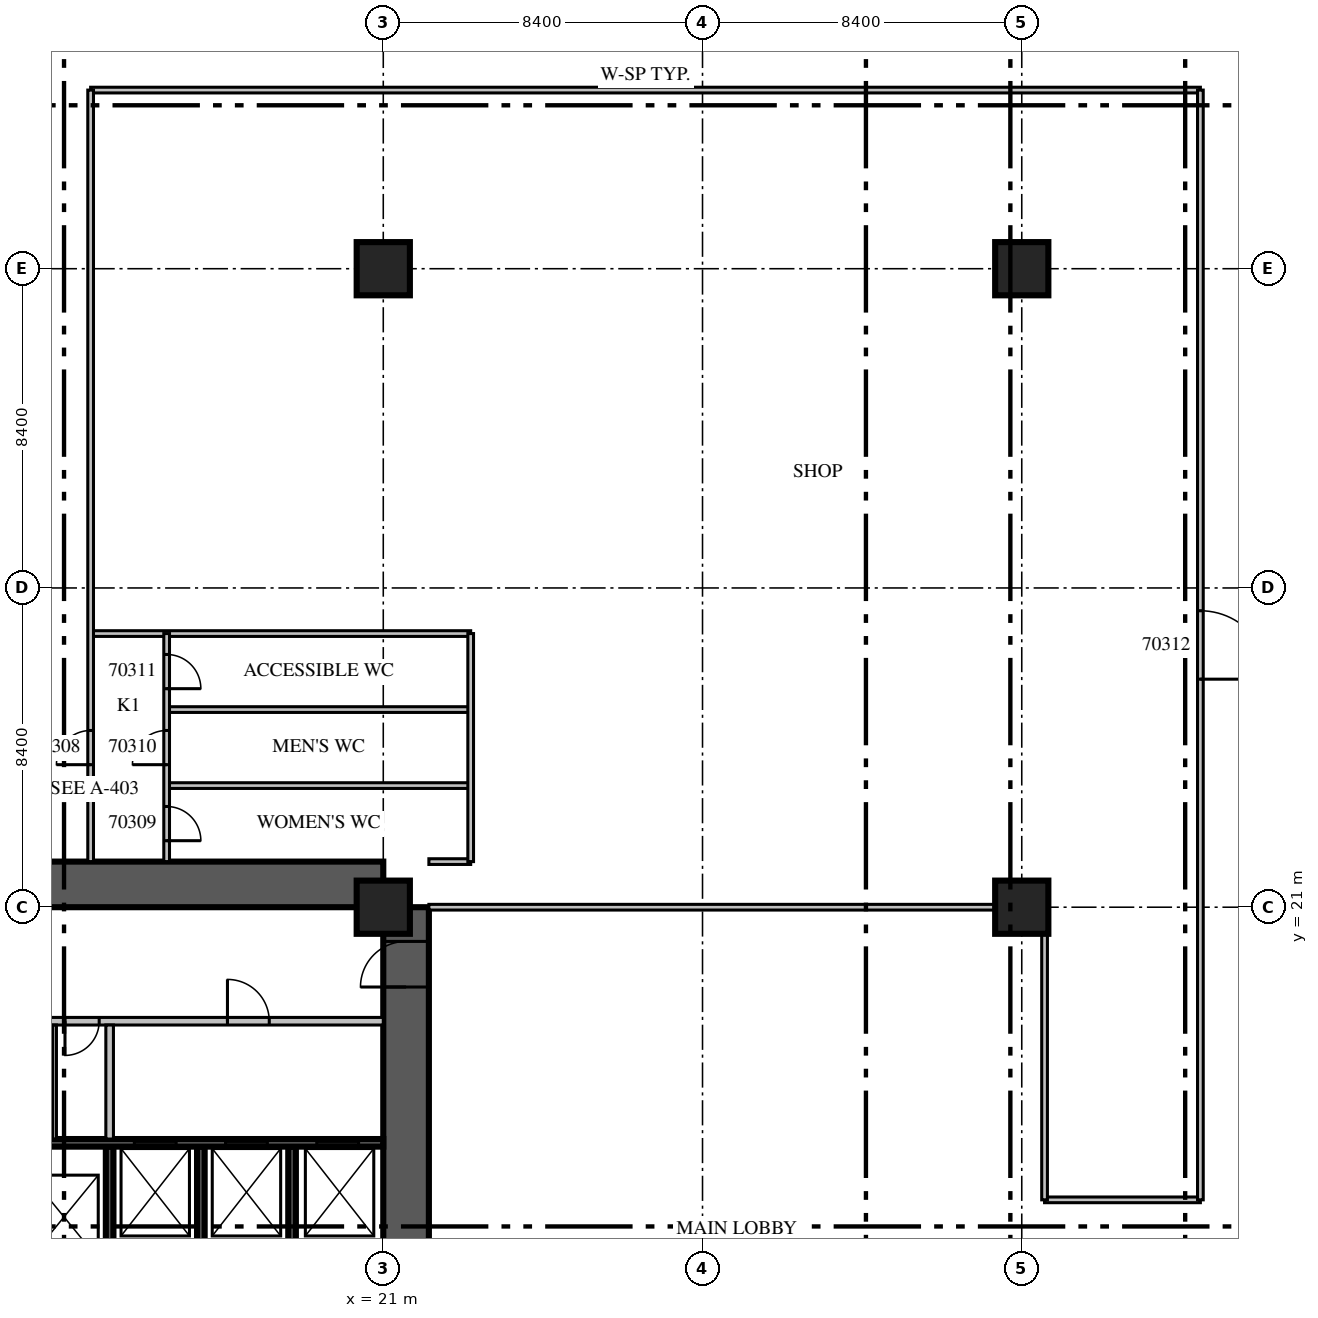
"""IFC4 building model, lengths in metres.
Left out: names, types, materials, properties, quantities, classifications, styles, units other than length and angle.
Written with IfcOpenShell. Run it as: python <this file> out.ifc"""

import sys

from ifc_helpers import new_model, si_unit, direction, frame, frame_2d, origin, origin_2d, place, context, subcontext, project, spatial, rectangle, extrude, source, transform, mapped, element, fill, save


model = new_model("IFC4")
c1 = context("Model", 3, precision=1e-05, world=origin(), true_north=direction((0.0, 1.0)))
c2 = subcontext(c1, "Body", "Model", "MODEL_VIEW")
j1 = project(units=[si_unit("LENGTHUNIT", "METRE"), si_unit("PLANEANGLEUNIT", "RADIAN")], contexts=[c1])
p1 = place(None, origin())
s1 = spatial("IfcSite", under=j1, at=p1, CompositionType="ELEMENT")
p2 = place(p1, origin())
s2 = spatial("IfcBuilding", under=s1, at=p2, CompositionType="ELEMENT")
p3 = place(p2, origin())
s3 = spatial("IfcBuildingStorey", under=s2, at=p3, CompositionType="ELEMENT", Elevation=0.0)
m1 = source(origin(), c2, "Body", "SweptSolid", [
    extrude(rectangle(XDim=1.4, YDim=1.4, at=origin_2d()), origin(), (0.0, 0.0, 1.0), 7.5),
])
for number, where, z_axis, x_axis in (
    (1, (21.0, 21.0, 0.0), (0.0, 0.0, 1.0), (1.0, 0.0, 0.0)),
    (2, (21.0, 37.8, 0.0), (0.0, 0.0, 1.0), (1.0, 0.0, 0.0)),
    (3, (37.8, 21.0, 0.0), (0.0, 0.0, 1.0), (1.0, 0.0, 0.0)),
    (4, (37.8, 37.8, 0.0), (0.0, 0.0, 1.0), (1.0, 0.0, 0.0)),
):
    element("IfcColumn", number, at=place(p3, frame(where, z_axis=z_axis, x_axis=x_axis)), inside=s3, PredefinedType="COLUMN", context=c2, shape_type="MappedRepresentation", body=[
        mapped(m1, transform((0.0, 0.0, 0.0), scale=1.0)),
    ])
p4 = place(p3, frame((21.6, 4.2, 0.0), z_axis=(0.0, 0.0, 1.0), x_axis=(0.0, 1.0, 0.0)))
e5 = element("IfcWall", 5, at=p4, inside=s3, PredefinedType="SHEAR", context=c2, shape_type="SweptSolid", body=[
    extrude(rectangle(XDim=16.8, YDim=1.2, at=frame_2d((8.4, 0.0))), origin(), (0.0, 0.0, 1.0), 7.5),
])
m2 = source(origin(), c2, "Body", "SweptSolid", [
    extrude(rectangle(XDim=2.2, YDim=2.1, at=frame_2d((1.1, 1.05))), frame((0.0, 0.61, 0.0), z_axis=(0.0, -1.0, 0.0), x_axis=(1.0, 0.0, 0.0)), (0.0, 0.0, 1.0), 1.22),
])
p5 = place(p4, frame((4.2, 0.0, 0.0)))
e6 = element("IfcOpeningElement", 6, at=p5, cuts=e5, PredefinedType="OPENING", context=c2, shape_type="MappedRepresentation", body=[
    mapped(m2, transform((0.0, 0.0, 0.0), scale=1.0)),
])
m3 = source(origin(), c2, "Body", "SweptSolid", [
    extrude(rectangle(XDim=1.2, YDim=2.1, at=frame_2d((0.6, 1.05))), frame((0.0, 0.61, 0.0), z_axis=(0.0, -1.0, 0.0), x_axis=(1.0, 0.0, 0.0)), (0.0, 0.0, 1.0), 1.22),
])
p6 = place(p4, frame((14.7, 0.0, 0.0)))
e7 = element("IfcOpeningElement", 7, at=p6, cuts=e5, PredefinedType="OPENING", context=c2, shape_type="MappedRepresentation", body=[
    mapped(m3, transform((0.0, 0.0, 0.0), scale=1.0)),
])
m4 = source(origin(), c2, "Body", "SweptSolid", [
    extrude(rectangle(XDim=16.8, YDim=1.2, at=frame_2d((8.4, 0.0))), origin(), (0.0, 0.0, 1.0), 7.5),
])
p7 = place(p3, frame((4.2, 21.6, 0.0), z_axis=(0.0, 0.0, 1.0), x_axis=(1.0, 0.0, 0.0)))
e8 = element("IfcWall", 8, at=p7, inside=s3, PredefinedType="SHEAR", context=c2, shape_type="MappedRepresentation", body=[
    mapped(m4, transform((0.0, 0.0, 0.0), scale=1.0)),
])
p8 = place(p7, frame((6.2, 0.0, 0.0)))
e9 = element("IfcOpeningElement", 9, at=p8, cuts=e8, PredefinedType="OPENING", context=c2, shape_type="MappedRepresentation", body=[
    mapped(m3, transform((0.0, 0.0, 0.0), scale=1.0)),
])
m5 = source(origin(), c2, "Body", "SweptSolid", [
    extrude(rectangle(XDim=3.0, YDim=0.2, at=frame_2d((1.5, 0.0))), origin(), (0.0, 0.0, 1.0), 7.5),
])
for number, where, z_axis, x_axis in (
    (10, (13.8, 11.7, 0.0), (0.0, 0.0, 1.0), (0.0, 1.0, 0.0)),
    (11, (16.2, 11.7, 0.0), (0.0, 0.0, 1.0), (0.0, 1.0, 0.0)),
    (12, (18.6, 11.7, 0.0), (0.0, 0.0, 1.0), (0.0, 1.0, 0.0)),
):
    element("IfcWall", number, at=place(p3, frame(where, z_axis=z_axis, x_axis=x_axis)), inside=s3, PredefinedType="SOLIDWALL", context=c2, shape_type="MappedRepresentation", body=[
        mapped(m5, transform((0.0, 0.0, 0.0), scale=1.0)),
    ])
m6 = source(origin(), c2, "Body", "SweptSolid", [
    extrude(rectangle(XDim=16.8, YDim=0.2, at=frame_2d((8.4, 0.0))), origin(), (0.0, 0.0, 1.0), 7.5),
])
p9 = place(p3, frame((4.2, 14.8, 0.0), z_axis=(0.0, 0.0, 1.0), x_axis=(1.0, 0.0, 0.0)))
e13 = element("IfcWall", 13, at=p9, inside=s3, PredefinedType="SOLIDWALL", context=c2, shape_type="MappedRepresentation", body=[
    mapped(m6, transform((0.0, 0.0, 0.0), scale=1.0)),
])
m7 = source(origin(), c2, "Body", "SweptSolid", [
    extrude(rectangle(XDim=1.1, YDim=2.1, at=frame_2d((0.55, 1.05))), frame((0.0, 0.11, 0.0), z_axis=(0.0, -1.0, 0.0), x_axis=(1.0, 0.0, 0.0)), (0.0, 0.0, 1.0), 0.22),
])
p10 = place(p9, frame((10.25, 0.0, 0.0)))
e14 = element("IfcOpeningElement", 14, at=p10, cuts=e13, PredefinedType="OPENING", context=c2, shape_type="MappedRepresentation", body=[
    mapped(m7, transform((0.0, 0.0, 0.0), scale=1.0)),
])
p11 = place(p9, frame((12.65, 0.0, 0.0)))
e15 = element("IfcOpeningElement", 15, at=p11, cuts=e13, PredefinedType="OPENING", context=c2, shape_type="MappedRepresentation", body=[
    mapped(m7, transform((0.0, 0.0, 0.0), scale=1.0)),
])
p12 = place(p9, frame((15.05, 0.0, 0.0)))
e16 = element("IfcOpeningElement", 16, at=p12, cuts=e13, PredefinedType="OPENING", context=c2, shape_type="MappedRepresentation", body=[
    mapped(m7, transform((0.0, 0.0, 0.0), scale=1.0)),
])
p13 = place(p3, frame((9.55, 18.0, 0.0), z_axis=(0.0, 0.0, 1.0), x_axis=(1.0, 0.0, 0.0)))
e17 = element("IfcWall", 17, at=p13, inside=s3, PredefinedType="PARTITIONING", context=c2, shape_type="SweptSolid", body=[
    extrude(rectangle(XDim=11.45, YDim=0.2, at=frame_2d((5.725, 0.0))), origin(), (0.0, 0.0, 1.0), 6.9),
])
m8 = source(origin(), c2, "Body", "SweptSolid", [
    extrude(rectangle(XDim=0.9, YDim=2.1, at=frame_2d((0.45, 1.05))), frame((0.0, 0.11, 0.0), z_axis=(0.0, -1.0, 0.0), x_axis=(1.0, 0.0, 0.0)), (0.0, 0.0, 1.0), 0.22),
])
p14 = place(p13, frame((0.375, 0.0, 0.0)))
e18 = element("IfcOpeningElement", 18, at=p14, cuts=e17, PredefinedType="OPENING", context=c2, shape_type="MappedRepresentation", body=[
    mapped(m8, transform((0.0, 0.0, 0.0), scale=1.0)),
])
p15 = place(p13, frame((1.7, 0.0, 0.0)))
e19 = element("IfcOpeningElement", 19, at=p15, cuts=e17, PredefinedType="OPENING", context=c2, shape_type="MappedRepresentation", body=[
    mapped(m8, transform((0.0, 0.0, 0.0), scale=1.0)),
])
p16 = place(p13, frame((3.075, 0.0, 0.0)))
e20 = element("IfcOpeningElement", 20, at=p16, cuts=e17, PredefinedType="OPENING", context=c2, shape_type="MappedRepresentation", body=[
    mapped(m8, transform((0.0, 0.0, 0.0), scale=1.0)),
])
p17 = place(p13, frame((7.35, 0.0, 0.0)))
e21 = element("IfcOpeningElement", 21, at=p17, cuts=e17, PredefinedType="OPENING", context=c2, shape_type="MappedRepresentation", body=[
    mapped(m7, transform((0.0, 0.0, 0.0), scale=1.0)),
])
m9 = source(origin(), c2, "Body", "SweptSolid", [
    extrude(rectangle(XDim=3.0, YDim=0.2, at=frame_2d((1.5, 0.0))), origin(), (0.0, 0.0, 1.0), 6.9),
])
p18 = place(p3, frame((13.8, 14.9, 0.0), z_axis=(0.0, 0.0, 1.0), x_axis=(0.0, 1.0, 0.0)))
e22 = element("IfcWall", 22, at=p18, inside=s3, PredefinedType="PARTITIONING", context=c2, shape_type="MappedRepresentation", body=[
    mapped(m9, transform((0.0, 0.0, 0.0), scale=1.0)),
])
m10 = source(origin(), c2, "Body", "SweptSolid", [
    extrude(rectangle(XDim=3.0, YDim=0.1, at=frame_2d((1.5, 0.0))), origin(), (0.0, 0.0, 1.0), 6.9),
])
p19 = place(p3, frame((12.35, 14.9, 0.0), z_axis=(0.0, 0.0, 1.0), x_axis=(0.0, 1.0, 0.0)))
e23 = element("IfcWall", 23, at=p19, inside=s3, PredefinedType="PARTITIONING", context=c2, shape_type="MappedRepresentation", body=[
    mapped(m10, transform((0.0, 0.0, 0.0), scale=1.0)),
])
p20 = place(p3, frame((38.4, 13.3, 0.0), z_axis=(0.0, 0.0, 1.0), x_axis=(1.0, 0.0, 0.0)))
e24 = element("IfcWall", 24, at=p20, inside=s3, PredefinedType="PARTITIONING", context=c2, shape_type="SweptSolid", body=[
    extrude(rectangle(XDim=4.1, YDim=0.15, at=frame_2d((2.05, 0.0))), origin(), (0.0, 0.0, 1.0), 6.9),
])
p21 = place(p3, frame((22.2, 21.0, 0.0), z_axis=(0.0, 0.0, 1.0), x_axis=(1.0, 0.0, 0.0)))
e25 = element("IfcWall", 25, at=p21, inside=s3, PredefinedType="PARTITIONING", context=c2, shape_type="SweptSolid", body=[
    extrude(rectangle(XDim=16.2, YDim=0.15, at=frame_2d((8.1, 0.0))), origin(), (0.0, 0.0, 1.0), 6.9),
])
p22 = place(p3, frame((22.2, 22.2, 0.0), z_axis=(0.0, 0.0, 1.0), x_axis=(1.0, 0.0, 0.0)))
e26 = element("IfcWall", 26, at=p22, inside=s3, PredefinedType="PARTITIONING", context=c2, shape_type="SweptSolid", body=[
    extrude(rectangle(XDim=1.1, YDim=0.15, at=frame_2d((0.55, 0.0))), origin(), (0.0, 0.0, 1.0), 6.9),
])
p23 = place(p3, frame((15.3, 24.2, 0.0), z_axis=(0.0, 0.0, 1.0), x_axis=(1.0, 0.0, 0.0)))
e27 = element("IfcWall", 27, at=p23, inside=s3, PredefinedType="PARTITIONING", context=c2, shape_type="SweptSolid", body=[
    extrude(rectangle(XDim=8.0, YDim=0.15, at=frame_2d((4.0, 0.0))), origin(), (0.0, 0.0, 1.0), 6.9),
])
m11 = source(origin(), c2, "Body", "SweptSolid", [
    extrude(rectangle(XDim=8.0, YDim=0.15, at=frame_2d((4.0, 0.0))), origin(), (0.0, 0.0, 1.0), 6.9),
])
p24 = place(p3, frame((15.3, 26.2, 0.0), z_axis=(0.0, 0.0, 1.0), x_axis=(1.0, 0.0, 0.0)))
e28 = element("IfcWall", 28, at=p24, inside=s3, PredefinedType="PARTITIONING", context=c2, shape_type="MappedRepresentation", body=[
    mapped(m11, transform((0.0, 0.0, 0.0), scale=1.0)),
])
p25 = place(p3, frame((13.3, 28.2, 0.0), z_axis=(0.0, 0.0, 1.0), x_axis=(1.0, 0.0, 0.0)))
e29 = element("IfcWall", 29, at=p25, inside=s3, PredefinedType="PARTITIONING", context=c2, shape_type="SweptSolid", body=[
    extrude(rectangle(XDim=10.0, YDim=0.15, at=frame_2d((5.0, 0.0))), origin(), (0.0, 0.0, 1.0), 6.9),
])
p26 = place(p3, frame((13.3, 42.5, 0.0), z_axis=(0.0, 0.0, 1.0), x_axis=(1.0, 0.0, 0.0)))
e30 = element("IfcWall", 30, at=p26, inside=s3, PredefinedType="PARTITIONING", context=c2, shape_type="SweptSolid", body=[
    extrude(rectangle(XDim=29.2, YDim=0.15, at=frame_2d((14.6, 0.0))), origin(), (0.0, 0.0, 1.0), 6.9),
])
p27 = place(p3, frame((13.3, 22.2, 0.0), z_axis=(0.0, 0.0, 1.0), x_axis=(0.0, 1.0, 0.0)))
e31 = element("IfcWall", 31, at=p27, inside=s3, PredefinedType="PARTITIONING", context=c2, shape_type="SweptSolid", body=[
    extrude(rectangle(XDim=20.3, YDim=0.15, at=frame_2d((10.15, 0.0))), origin(), (0.0, 0.0, 1.0), 6.9),
])
m12 = source(origin(), c2, "Body", "SweptSolid", [
    extrude(rectangle(XDim=0.9, YDim=2.1, at=frame_2d((0.45, 1.05))), frame((0.0, 0.085, 0.0), z_axis=(0.0, -1.0, 0.0), x_axis=(1.0, 0.0, 0.0)), (0.0, 0.0, 1.0), 0.17),
])
p28 = place(p27, frame((2.55, 0.0, 0.0)))
e32 = element("IfcOpeningElement", 32, at=p28, cuts=e31, PredefinedType="OPENING", context=c2, shape_type="MappedRepresentation", body=[
    mapped(m12, transform((0.0, 0.0, 0.0), scale=1.0)),
])
p29 = place(p3, frame((15.3, 22.2, 0.0), z_axis=(0.0, 0.0, 1.0), x_axis=(0.0, 1.0, 0.0)))
e33 = element("IfcWall", 33, at=p29, inside=s3, PredefinedType="PARTITIONING", context=c2, shape_type="SweptSolid", body=[
    extrude(rectangle(XDim=6.0, YDim=0.15, at=frame_2d((3.0, 0.0))), origin(), (0.0, 0.0, 1.0), 6.9),
])
p30 = place(p29, frame((0.55, 0.0, 0.0)))
e34 = element("IfcOpeningElement", 34, at=p30, cuts=e33, PredefinedType="OPENING", context=c2, shape_type="MappedRepresentation", body=[
    mapped(m12, transform((0.0, 0.0, 0.0), scale=1.0)),
])
p31 = place(p29, frame((2.55, 0.0, 0.0)))
e35 = element("IfcOpeningElement", 35, at=p31, cuts=e33, PredefinedType="OPENING", context=c2, shape_type="MappedRepresentation", body=[
    mapped(m12, transform((0.0, 0.0, 0.0), scale=1.0)),
])
p32 = place(p29, frame((4.55, 0.0, 0.0)))
e36 = element("IfcOpeningElement", 36, at=p32, cuts=e33, PredefinedType="OPENING", context=c2, shape_type="MappedRepresentation", body=[
    mapped(m12, transform((0.0, 0.0, 0.0), scale=1.0)),
])
m13 = source(origin(), c2, "Body", "SweptSolid", [
    extrude(rectangle(XDim=6.0, YDim=0.15, at=frame_2d((3.0, 0.0))), origin(), (0.0, 0.0, 1.0), 6.9),
])
p33 = place(p3, frame((23.3, 22.2, 0.0), z_axis=(0.0, 0.0, 1.0), x_axis=(0.0, 1.0, 0.0)))
e37 = element("IfcWall", 37, at=p33, inside=s3, PredefinedType="PARTITIONING", context=c2, shape_type="MappedRepresentation", body=[
    mapped(m13, transform((0.0, 0.0, 0.0), scale=1.0)),
])
p34 = place(p3, frame((38.4, 13.3, 0.0), z_axis=(0.0, 0.0, 1.0), x_axis=(0.0, 1.0, 0.0)))
e38 = element("IfcWall", 38, at=p34, inside=s3, PredefinedType="PARTITIONING", context=c2, shape_type="SweptSolid", body=[
    extrude(rectangle(XDim=7.7, YDim=0.15, at=frame_2d((3.85, 0.0))), origin(), (0.0, 0.0, 1.0), 6.9),
])
m14 = source(origin(), c2, "Body", "SweptSolid", [
    extrude(rectangle(XDim=29.2, YDim=0.15, at=frame_2d((14.6, 0.0))), origin(), (0.0, 0.0, 1.0), 6.9),
])
p35 = place(p3, frame((42.5, 13.3, 0.0), z_axis=(0.0, 0.0, 1.0), x_axis=(0.0, 1.0, 0.0)))
e39 = element("IfcWall", 39, at=p35, inside=s3, PredefinedType="PARTITIONING", context=c2, shape_type="MappedRepresentation", body=[
    mapped(m14, transform((0.0, 0.0, 0.0), scale=1.0)),
])
m15 = source(origin(), c2, "Body", "SweptSolid", [
    extrude(rectangle(XDim=1.8, YDim=2.1, at=frame_2d((0.9, 1.05))), frame((0.0, 0.085, 0.0), z_axis=(0.0, -1.0, 0.0), x_axis=(1.0, 0.0, 0.0)), (0.0, 0.0, 1.0), 0.17),
])
p36 = place(p35, frame((13.7, 0.0, 0.0)))
e40 = element("IfcOpeningElement", 40, at=p36, cuts=e39, PredefinedType="OPENING", context=c2, shape_type="MappedRepresentation", body=[
    mapped(m15, transform((0.0, 0.0, 0.0), scale=1.0)),
])
m16 = source(origin(), c2, "Body", "SweptSolid", [
    extrude(rectangle(XDim=1.1, YDim=2.1, at=frame_2d((0.55, 1.05))), frame((0.0, 0.025, 0.0), z_axis=(0.0, -1.0, 0.0), x_axis=(1.0, 0.0, 0.0)), (0.0, 0.0, 1.0), 0.05),
])
p37 = place(p10, origin())
e41 = element("IfcDoor", 41, at=p37, inside=s3, OperationType="SLIDING_TO_LEFT", PredefinedType="DOOR", context=c2, shape_type="MappedRepresentation", body=[
    mapped(m16, transform((0.0, 0.0, 0.0), scale=1.0)),
])
fill(e14, e41)
p38 = place(p11, origin())
e42 = element("IfcDoor", 42, at=p38, inside=s3, OperationType="SLIDING_TO_LEFT", PredefinedType="DOOR", context=c2, shape_type="MappedRepresentation", body=[
    mapped(m16, transform((0.0, 0.0, 0.0), scale=1.0)),
])
fill(e15, e42)
p39 = place(p12, origin())
e43 = element("IfcDoor", 43, at=p39, inside=s3, OperationType="SLIDING_TO_LEFT", PredefinedType="DOOR", context=c2, shape_type="MappedRepresentation", body=[
    mapped(m16, transform((0.0, 0.0, 0.0), scale=1.0)),
])
fill(e16, e43)
m17 = source(origin(), c2, "Body", "SweptSolid", [
    extrude(rectangle(XDim=0.9, YDim=2.1, at=frame_2d((0.45, 1.05))), frame((0.0, 0.025, 0.0), z_axis=(0.0, -1.0, 0.0), x_axis=(1.0, 0.0, 0.0)), (0.0, 0.0, 1.0), 0.05),
])
p40 = place(p16, origin())
e44 = element("IfcDoor", 44, at=p40, inside=s3, OperationType="SINGLE_SWING_RIGHT", PredefinedType="DOOR", context=c2, shape_type="MappedRepresentation", body=[
    mapped(m17, transform((0.0, 0.0, 0.0), scale=1.0)),
])
fill(e20, e44)
p41 = place(p17, origin())
e45 = element("IfcDoor", 45, at=p41, inside=s3, OperationType="SINGLE_SWING_LEFT", PredefinedType="DOOR", context=c2, shape_type="MappedRepresentation", body=[
    mapped(m16, transform((0.0, 0.0, 0.0), scale=1.0)),
])
fill(e21, e45)
m18 = source(origin(), c2, "Body", "SweptSolid", [
    extrude(rectangle(XDim=1.2, YDim=2.1, at=frame_2d((0.6, 1.05))), frame((0.0, 0.025, 0.0), z_axis=(0.0, -1.0, 0.0), x_axis=(1.0, 0.0, 0.0)), (0.0, 0.0, 1.0), 0.05),
])
p42 = place(p6, origin())
e46 = element("IfcDoor", 46, at=p42, inside=s3, OperationType="SINGLE_SWING_LEFT", PredefinedType="DOOR", context=c2, shape_type="MappedRepresentation", body=[
    mapped(m18, transform((0.0, 0.0, 0.0), scale=1.0)),
])
fill(e7, e46)
p43 = place(p28, origin())
e47 = element("IfcDoor", 47, at=p43, inside=s3, OperationType="SINGLE_SWING_LEFT", PredefinedType="DOOR", context=c2, shape_type="MappedRepresentation", body=[
    mapped(m17, transform((0.0, 0.0, 0.0), scale=1.0)),
])
fill(e32, e47)
p44 = place(p30, origin())
e48 = element("IfcDoor", 48, at=p44, inside=s3, OperationType="SINGLE_SWING_RIGHT", PredefinedType="DOOR", context=c2, shape_type="MappedRepresentation", body=[
    mapped(m17, transform((0.0, 0.0, 0.0), scale=1.0)),
])
fill(e34, e48)
p45 = place(p31, origin())
e49 = element("IfcDoor", 49, at=p45, inside=s3, OperationType="SINGLE_SWING_LEFT", PredefinedType="DOOR", context=c2, shape_type="MappedRepresentation", body=[
    mapped(m17, transform((0.0, 0.0, 0.0), scale=1.0)),
])
fill(e35, e49)
p46 = place(p32, origin())
e50 = element("IfcDoor", 50, at=p46, inside=s3, OperationType="SINGLE_SWING_RIGHT", PredefinedType="DOOR", context=c2, shape_type="MappedRepresentation", body=[
    mapped(m17, transform((0.0, 0.0, 0.0), scale=1.0)),
])
fill(e36, e50)
m19 = source(origin(), c2, "Body", "SweptSolid", [
    extrude(rectangle(XDim=1.8, YDim=2.1, at=frame_2d((0.9, 1.05))), frame((0.0, 0.025, 0.0), z_axis=(0.0, -1.0, 0.0), x_axis=(1.0, 0.0, 0.0)), (0.0, 0.0, 1.0), 0.05),
])
p47 = place(p36, origin())
e51 = element("IfcDoor", 51, at=p47, inside=s3, OperationType="DOUBLE_DOOR_SINGLE_SWING", PredefinedType="DOOR", context=c2, shape_type="MappedRepresentation", body=[
    mapped(m19, transform((0.0, 0.0, 0.0), scale=1.0)),
])
fill(e40, e51)
save(model, sys.argv[1])
